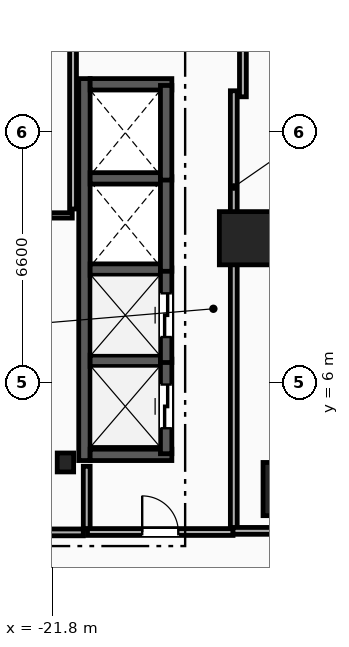
"""IFC4 building model, lengths in metres.
Left out: names, types, materials, properties, quantities, classifications, styles, units other than length and angle.
Written with IfcOpenShell. Run it as: python <this file> out.ifc"""

import sys

from ifc_helpers import new_model, si_unit, direction, frame, frame_2d, origin, origin_2d, place, context, subcontext, project, spatial, rectangle, i_section, extrude, element, fill, save


model = new_model("IFC4")
c1 = context("Model", 3, precision=1e-05, world=origin(), true_north=direction((0.0, 1.0)))
c2 = subcontext(c1, "Body", "Model", "MODEL_VIEW")
j1 = project(units=[si_unit("LENGTHUNIT", "METRE"), si_unit("PLANEANGLEUNIT", "RADIAN")], contexts=[c1])
p1 = place(None, origin())
s1 = spatial("IfcSite", under=j1, at=p1, CompositionType="ELEMENT")
p2 = place(p1, origin())
s2 = spatial("IfcBuilding", under=s1, at=p2, CompositionType="ELEMENT")
p3 = place(p2, frame((0.0, 0.0, 12.0)))
s3 = spatial("IfcBuildingStorey", under=s2, at=p3, CompositionType="ELEMENT", Elevation=12.0)
p4 = place(p3, frame((-21.45, 3.9, 0.0), z_axis=(0.0, 0.0, 1.0), x_axis=(1.0, 0.0, 0.0)))
e1 = element("IfcColumn", 1, at=p4, inside=s3, PredefinedType="COLUMN", context=c2, shape_type="SweptSolid", body=[
    extrude(i_section(OverallWidth=0.432, OverallDepth=0.498, WebThickness=0.056, FlangeThickness=0.089, FilletRadius=0.018, at=origin_2d()), origin(), (0.0, 0.0, 1.0), 4.0),
])
for number, where, z_axis, x_axis in (
    (2, (-15.55, 3.2, 0.0), (0.0, 0.0, 1.0), (1.0, 0.0, 0.0)),
    (3, (-16.7, 9.8, 0.0), (0.0, 0.0, 1.0), (1.0, 0.0, 0.0)),
):
    element("IfcColumn", number, at=place(p3, frame(where, z_axis=z_axis, x_axis=x_axis)), inside=s3, PredefinedType="COLUMN", context=c2, shape_type="SweptSolid", body=[
        extrude(rectangle(XDim=1.4, YDim=1.4, at=origin_2d()), origin(), (0.0, 0.0, 1.0), 4.0),
    ])
p5 = place(p3, frame((-20.89, 2.15, 0.0), z_axis=(0.0, 0.0, 1.0), x_axis=(0.0, 1.0, 0.0)))
e4 = element("IfcWall", 4, at=p5, inside=s3, PredefinedType="PARTITIONING", context=c2, shape_type="SweptSolid", body=[
    extrude(rectangle(XDim=1.65, YDim=0.18, at=frame_2d((0.825, 0.0))), origin(), (0.0, 0.0, 1.0), 3.65),
])
p6 = place(p3, frame((-23.98, 2.06, 0.0), z_axis=(0.0, 0.0, 1.0), x_axis=(1.0, 0.0, 0.0)))
e5 = element("IfcWall", 5, at=p6, inside=s3, PredefinedType="PARTITIONING", context=c2, shape_type="SweptSolid", body=[
    extrude(rectangle(XDim=3.0, YDim=0.18, at=frame_2d((1.5, 0.0))), origin(), (0.0, 0.0, 1.0), 3.65),
])
p7 = place(p6, frame((0.9, 0.0, 0.0)))
e6 = element("IfcOpeningElement", 6, at=p7, cuts=e5, PredefinedType="OPENING", context=c2, shape_type="SweptSolid", body=[
    extrude(rectangle(XDim=1.2, YDim=2.15, at=frame_2d((0.6, 1.075))), frame((0.0, 0.1, 0.0), z_axis=(0.0, -1.0, 0.0), x_axis=(1.0, 0.0, 0.0)), (0.0, 0.0, 1.0), 0.2),
])
p8 = place(p3, frame((-20.95, 3.95, 0.0), z_axis=(0.0, 0.0, 1.0), x_axis=(0.0, 1.0, 0.0)))
e7 = element("IfcWall", 7, at=p8, inside=s3, PredefinedType="SHEAR", context=c2, shape_type="SweptSolid", body=[
    extrude(rectangle(XDim=10.05, YDim=0.3, at=frame_2d((5.025, 0.0))), origin(), (0.0, 0.0, 1.0), 3.65),
])
for number, where, z_axis, x_axis in (
    (8, (-20.8, 4.1, 0.0), (0.0, 0.0, 1.0), (1.0, 0.0, 0.0)),
    (9, (-20.8, 13.85, 0.0), (0.0, 0.0, 1.0), (1.0, 0.0, 0.0)),
):
    element("IfcWall", number, at=place(p3, frame(where, z_axis=z_axis, x_axis=x_axis)), inside=s3, PredefinedType="SHEAR", context=c2, shape_type="SweptSolid", body=[
        extrude(rectangle(XDim=2.15, YDim=0.3, at=frame_2d((1.075, 0.0))), origin(), (0.0, 0.0, 1.0), 3.65),
    ])
for number, where, z_axis, x_axis in (
    (10, (-20.8, 6.575, 0.0), (0.0, 0.0, 1.0), (1.0, 0.0, 0.0)),
    (11, (-20.8, 8.975, 0.0), (0.0, 0.0, 1.0), (1.0, 0.0, 0.0)),
    (12, (-20.8, 11.375, 0.0), (0.0, 0.0, 1.0), (1.0, 0.0, 0.0)),
):
    element("IfcWall", number, at=place(p3, frame(where, z_axis=z_axis, x_axis=x_axis)), inside=s3, PredefinedType="SHEAR", context=c2, shape_type="SweptSolid", body=[
        extrude(rectangle(XDim=1.85, YDim=0.3, at=frame_2d((0.925, 0.0))), origin(), (0.0, 0.0, 1.0), 3.65),
    ])
p9 = place(p3, frame((-18.8, 4.13, 0.0), z_axis=(0.0, 0.0, 1.0), x_axis=(0.0, 1.0, 0.0)))
e13 = element("IfcWall", 13, at=p9, inside=s3, PredefinedType="SHEAR", context=c2, shape_type="SweptSolid", body=[
    extrude(rectangle(XDim=2.49, YDim=0.3, at=frame_2d((1.245, 0.0))), origin(), (0.0, 0.0, 1.0), 3.65),
])
p10 = place(p9, frame((0.67, 0.0, 0.0)))
e14 = element("IfcOpeningElement", 14, at=p10, cuts=e13, PredefinedType="OPENING", context=c2, shape_type="SweptSolid", body=[
    extrude(rectangle(XDim=1.15, YDim=2.2, at=frame_2d((0.575, 1.1))), frame((0.0, 0.16, 0.0), z_axis=(0.0, -1.0, 0.0), x_axis=(1.0, 0.0, 0.0)), (0.0, 0.0, 1.0), 0.32),
])
p11 = place(p3, frame((-18.8, 6.53, 0.0), z_axis=(0.0, 0.0, 1.0), x_axis=(0.0, 1.0, 0.0)))
e15 = element("IfcWall", 15, at=p11, inside=s3, PredefinedType="SHEAR", context=c2, shape_type="SweptSolid", body=[
    extrude(rectangle(XDim=2.49, YDim=0.3, at=frame_2d((1.245, 0.0))), origin(), (0.0, 0.0, 1.0), 3.65),
])
p12 = place(p11, frame((0.67, 0.0, 0.0)))
e16 = element("IfcOpeningElement", 16, at=p12, cuts=e15, PredefinedType="OPENING", context=c2, shape_type="SweptSolid", body=[
    extrude(rectangle(XDim=1.15, YDim=2.2, at=frame_2d((0.575, 1.1))), frame((0.0, 0.16, 0.0), z_axis=(0.0, -1.0, 0.0), x_axis=(1.0, 0.0, 0.0)), (0.0, 0.0, 1.0), 0.32),
])
for number, where, z_axis, x_axis in (
    (17, (-18.8, 8.93, 0.0), (0.0, 0.0, 1.0), (0.0, 1.0, 0.0)),
    (18, (-18.8, 11.33, 0.0), (0.0, 0.0, 1.0), (0.0, 1.0, 0.0)),
):
    element("IfcWall", number, at=place(p3, frame(where, z_axis=z_axis, x_axis=x_axis)), inside=s3, PredefinedType="SHEAR", context=c2, shape_type="SweptSolid", body=[
        extrude(rectangle(XDim=2.49, YDim=0.3, at=frame_2d((1.245, 0.0))), origin(), (0.0, 0.0, 1.0), 3.65),
    ])
p13 = place(p3, frame((-17.02, 2.17, 0.0), z_axis=(0.0, 0.0, 1.0), x_axis=(0.0, 1.0, 0.0)))
e19 = element("IfcWall", 19, at=p13, inside=s3, PredefinedType="PARTITIONING", context=c2, shape_type="SweptSolid", body=[
    extrude(rectangle(XDim=11.51, YDim=0.18, at=frame_2d((5.755, 0.0))), origin(), (0.0, 0.0, 1.0), 3.65),
])
p14 = place(p3, frame((-20.87, 2.07, 0.0), z_axis=(0.0, 0.0, 1.0), x_axis=(1.0, 0.0, 0.0)))
e20 = element("IfcWall", 20, at=p14, inside=s3, PredefinedType="PARTITIONING", context=c2, shape_type="SweptSolid", body=[
    extrude(rectangle(XDim=3.83, YDim=0.18, at=frame_2d((1.915, 0.0))), origin(), (0.0, 0.0, 1.0), 3.65),
])
p15 = place(p14, frame((1.44, 0.0, 0.0)))
e21 = element("IfcOpeningElement", 21, at=p15, cuts=e20, PredefinedType="OPENING", context=c2, shape_type="SweptSolid", body=[
    extrude(rectangle(XDim=0.95, YDim=2.1, at=frame_2d((0.475, 1.05))), frame((0.0, 0.1, 0.0), z_axis=(0.0, -1.0, 0.0), x_axis=(1.0, 0.0, 0.0)), (0.0, 0.0, 1.0), 0.2),
])
p16 = place(p3, frame((-21.86, 10.4, 0.0), z_axis=(0.0, 0.0, 1.0), x_axis=(1.0, 0.0, 0.0)))
e22 = element("IfcWall", 22, at=p16, inside=s3, PredefinedType="PARTITIONING", context=c2, shape_type="SweptSolid", body=[
    extrude(rectangle(XDim=0.59, YDim=0.14, at=frame_2d((0.295, 0.0))), origin(), (0.0, 0.0, 1.0), 3.65),
])
p17 = place(p3, frame((-21.25, 10.57, 0.0), z_axis=(0.0, 0.0, 1.0), x_axis=(0.0, 1.0, 0.0)))
e23 = element("IfcWall", 23, at=p17, inside=s3, PredefinedType="PARTITIONING", context=c2, shape_type="SweptSolid", body=[
    extrude(rectangle(XDim=4.36, YDim=0.18, at=frame_2d((2.18, 0.0))), origin(), (0.0, 0.0, 1.0), 3.65),
])
p18 = place(p3, frame((-8.595, 2.1, 0.0), z_axis=(0.0, 0.0, 1.0), x_axis=(-1.0, 0.0, 0.0)))
e24 = element("IfcWall", 24, at=p18, inside=s3, PredefinedType="PARTITIONING", context=c2, shape_type="SweptSolid", body=[
    extrude(rectangle(XDim=8.445, YDim=0.18, at=frame_2d((4.223, 0.0))), origin(), (0.0, 0.0, 1.0), 2.877),
])
p19 = place(p18, frame((3.522, 0.0, 1.05)))
e25 = element("IfcOpeningElement", 25, at=p19, cuts=e24, PredefinedType="OPENING", context=c2, shape_type="SweptSolid", body=[
    extrude(rectangle(XDim=1.4, YDim=1.5, at=frame_2d((0.7, 0.75))), frame((0.0, 0.1, 0.0), z_axis=(0.0, -1.0, 0.0), x_axis=(1.0, 0.0, 0.0)), (0.0, 0.0, 1.0), 0.2),
])
p20 = place(p3, frame((-16.78, 13.521, 0.0), z_axis=(0.0, 0.0, 1.0), x_axis=(0.0, 1.0, 0.0)))
e26 = element("IfcWall", 26, at=p20, inside=s3, PredefinedType="PARTITIONING", context=c2, shape_type="SweptSolid", body=[
    extrude(rectangle(XDim=3.907, YDim=0.18, at=frame_2d((1.954, 0.0))), origin(), (0.0, 0.0, 1.0), 3.65),
])
p21 = place(p10, origin())
e27 = element("IfcDoor", 27, at=p21, inside=s3, OperationType="SLIDING_TO_LEFT", PredefinedType="TRAPDOOR", context=c2, shape_type="SweptSolid", body=[
    extrude(rectangle(XDim=1.15, YDim=2.2, at=frame_2d((0.575, 1.1))), frame((0.0, 0.025, 0.0), z_axis=(0.0, -1.0, 0.0), x_axis=(1.0, 0.0, 0.0)), (0.0, 0.0, 1.0), 0.05),
])
fill(e14, e27)
p22 = place(p12, origin())
e28 = element("IfcDoor", 28, at=p22, inside=s3, OperationType="SLIDING_TO_LEFT", PredefinedType="TRAPDOOR", context=c2, shape_type="SweptSolid", body=[
    extrude(rectangle(XDim=1.15, YDim=2.2, at=frame_2d((0.575, 1.1))), frame((0.0, 0.025, 0.0), z_axis=(0.0, -1.0, 0.0), x_axis=(1.0, 0.0, 0.0)), (0.0, 0.0, 1.0), 0.05),
])
fill(e16, e28)
p23 = place(p15, origin())
e29 = element("IfcDoor", 29, at=p23, inside=s3, OperationType="SINGLE_SWING_LEFT", PredefinedType="DOOR", context=c2, shape_type="SweptSolid", body=[
    extrude(rectangle(XDim=0.95, YDim=2.1, at=frame_2d((0.475, 1.05))), frame((0.0, 0.025, 0.0), z_axis=(0.0, -1.0, 0.0), x_axis=(1.0, 0.0, 0.0)), (0.0, 0.0, 1.0), 0.05),
])
fill(e21, e29)
save(model, sys.argv[1])
